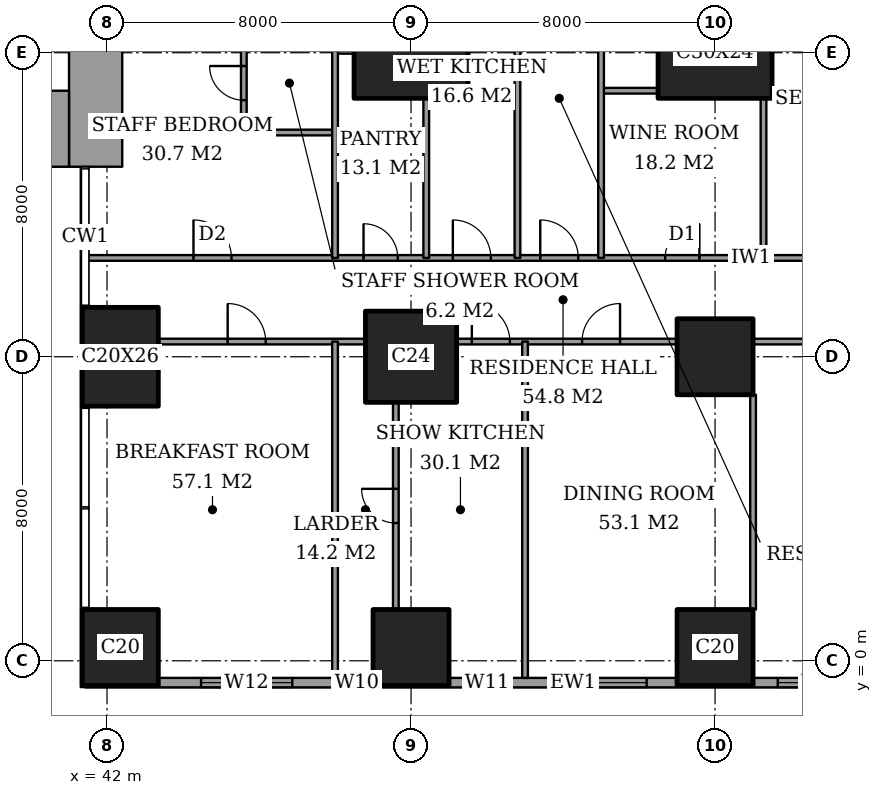
"""IFC4 building model, lengths in metres.
Left out: names, types, materials, properties, quantities, classifications, styles, units other than length and angle.
Written with IfcOpenShell. Run it as: python <this file> out.ifc"""

import sys

from ifc_helpers import new_model, si_unit, direction, frame, frame_2d, origin, origin_2d, place, context, subcontext, project, spatial, rectangle, extrude, element, fill, save


model = new_model("IFC4")
c1 = context("Model", 3, precision=1e-05, world=origin(), true_north=direction((0.0, 1.0)))
c2 = subcontext(c1, "Body", "Model", "MODEL_VIEW")
j1 = project(units=[si_unit("LENGTHUNIT", "METRE"), si_unit("PLANEANGLEUNIT", "RADIAN")], contexts=[c1])
p1 = place(None, origin())
s1 = spatial("IfcSite", under=j1, at=p1, CompositionType="ELEMENT")
p2 = place(p1, origin())
s2 = spatial("IfcBuilding", under=s1, at=p2, CompositionType="ELEMENT")
p3 = place(p2, frame((0.0, 0.0, 146.6)))
s3 = spatial("IfcBuildingStorey", under=s2, at=p3, CompositionType="ELEMENT", Elevation=146.6)
p4 = place(p3, frame((42.35, 0.35, 0.0), z_axis=(0.0, 0.0, 1.0), x_axis=(1.0, 0.0, 0.0)))
e1 = element("IfcColumn", 1, at=p4, inside=s3, PredefinedType="COLUMN", context=c2, shape_type="SweptSolid", body=[
    extrude(rectangle(XDim=2.0, YDim=2.0, at=origin_2d()), origin(), (0.0, 0.0, 1.0), 3.6),
])
p5 = place(p3, frame((42.35, 8.0, 0.0), z_axis=(0.0, 0.0, 1.0), x_axis=(1.0, 0.0, 0.0)))
e2 = element("IfcColumn", 2, at=p5, inside=s3, PredefinedType="COLUMN", context=c2, shape_type="SweptSolid", body=[
    extrude(rectangle(XDim=2.0, YDim=2.6, at=origin_2d()), origin(), (0.0, 0.0, 1.0), 3.6),
])
p6 = place(p3, frame((50.0, 0.35, 0.0), z_axis=(0.0, 0.0, 1.0), x_axis=(1.0, 0.0, 0.0)))
e3 = element("IfcColumn", 3, at=p6, inside=s3, PredefinedType="COLUMN", context=c2, shape_type="SweptSolid", body=[
    extrude(rectangle(XDim=2.0, YDim=2.0, at=origin_2d()), origin(), (0.0, 0.0, 1.0), 3.6),
])
p7 = place(p3, frame((50.0, 8.0, 0.0), z_axis=(0.0, 0.0, 1.0), x_axis=(1.0, 0.0, 0.0)))
e4 = element("IfcColumn", 4, at=p7, inside=s3, PredefinedType="COLUMN", context=c2, shape_type="SweptSolid", body=[
    extrude(rectangle(XDim=2.4, YDim=2.4, at=origin_2d()), origin(), (0.0, 0.0, 1.0), 3.6),
])
p8 = place(p3, frame((50.0, 16.0, 0.0), z_axis=(0.0, 0.0, 1.0), x_axis=(1.0, 0.0, 0.0)))
e5 = element("IfcColumn", 5, at=p8, inside=s3, PredefinedType="COLUMN", context=c2, shape_type="SweptSolid", body=[
    extrude(rectangle(XDim=3.0, YDim=2.4, at=origin_2d()), origin(), (0.0, 0.0, 1.0), 3.6),
])
for number, where, z_axis, x_axis in (
    (6, (58.0, 0.35, 0.0), (0.0, 0.0, 1.0), (1.0, 0.0, 0.0)),
    (7, (58.0, 8.0, 0.0), (0.0, 0.0, 1.0), (1.0, 0.0, 0.0)),
):
    element("IfcColumn", number, at=place(p3, frame(where, z_axis=z_axis, x_axis=x_axis)), inside=s3, PredefinedType="COLUMN", context=c2, shape_type="SweptSolid", body=[
        extrude(rectangle(XDim=2.0, YDim=2.0, at=origin_2d()), origin(), (0.0, 0.0, 1.0), 3.6),
    ])
p9 = place(p3, frame((58.0, 16.0, 0.0), z_axis=(0.0, 0.0, 1.0), x_axis=(1.0, 0.0, 0.0)))
e8 = element("IfcColumn", 8, at=p9, inside=s3, PredefinedType="COLUMN", context=c2, shape_type="SweptSolid", body=[
    extrude(rectangle(XDim=3.0, YDim=2.4, at=origin_2d()), origin(), (0.0, 0.0, 1.0), 3.6),
])
p10 = place(p3, frame((37.85, 14.0, 0.0), z_axis=(0.0, 0.0, 1.0), x_axis=(1.0, 0.0, 0.0)))
e9 = element("IfcWall", 9, at=p10, inside=s3, PredefinedType="SHEAR", context=c2, shape_type="SweptSolid", body=[
    extrude(rectangle(XDim=3.15, YDim=2.0, at=frame_2d((1.575, 0.0))), origin(), (0.0, 0.0, 1.0), 3.6),
])
p11 = place(p3, frame((41.7, 13.0, 0.0), z_axis=(0.0, 0.0, 1.0), x_axis=(0.0, 1.0, 0.0)))
e10 = element("IfcWall", 10, at=p11, inside=s3, PredefinedType="SHEAR", context=c2, shape_type="SweptSolid", body=[
    extrude(rectangle(XDim=11.85, YDim=1.4, at=frame_2d((5.925, 0.0))), origin(), (0.0, 0.0, 1.0), 3.6),
])
p12 = place(p11, frame((7.5, 0.0, 0.0)))
e11 = element("IfcOpeningElement", 11, at=p12, cuts=e10, PredefinedType="OPENING", context=c2, shape_type="SweptSolid", body=[
    extrude(rectangle(XDim=1.8, YDim=2.4, at=frame_2d((0.9, 1.2))), frame((0.0, 0.71, 0.0), z_axis=(0.0, -1.0, 0.0), x_axis=(1.0, 0.0, 0.0)), (0.0, 0.0, 1.0), 1.42),
])
p13 = place(p3, frame((41.425, -0.575, 0.0), z_axis=(0.0, 0.0, 1.0), x_axis=(1.0, 0.0, 0.0)))
e12 = element("IfcWall", 12, at=p13, inside=s3, PredefinedType="SOLIDWALL", context=c2, shape_type="SweptSolid", body=[
    extrude(rectangle(XDim=21.4, YDim=0.25, at=frame_2d((10.7, 0.0))), origin(), (0.0, 0.0, 1.0), 3.6),
])
p14 = place(p13, frame((3.05, 0.0, 0.4)))
e13 = element("IfcOpeningElement", 13, at=p14, cuts=e12, PredefinedType="OPENING", context=c2, shape_type="SweptSolid", body=[
    extrude(rectangle(XDim=2.4, YDim=2.2, at=frame_2d((1.2, 1.1))), frame((0.0, 0.135, 0.0), z_axis=(0.0, -1.0, 0.0), x_axis=(1.0, 0.0, 0.0)), (0.0, 0.0, 1.0), 0.27),
])
p15 = place(p13, frame((6.85, 0.0, 0.4)))
e14 = element("IfcOpeningElement", 14, at=p15, cuts=e12, PredefinedType="OPENING", context=c2, shape_type="SweptSolid", body=[
    extrude(rectangle(XDim=0.6, YDim=2.2, at=frame_2d((0.3, 1.1))), frame((0.0, 0.135, 0.0), z_axis=(0.0, -1.0, 0.0), x_axis=(1.0, 0.0, 0.0)), (0.0, 0.0, 1.0), 0.27),
])
p16 = place(p13, frame((9.975, 0.0, 0.4)))
e15 = element("IfcOpeningElement", 15, at=p16, cuts=e12, PredefinedType="OPENING", context=c2, shape_type="SweptSolid", body=[
    extrude(rectangle(XDim=1.2, YDim=2.2, at=frame_2d((0.6, 1.1))), frame((0.0, 0.135, 0.0), z_axis=(0.0, -1.0, 0.0), x_axis=(1.0, 0.0, 0.0)), (0.0, 0.0, 1.0), 0.27),
])
p17 = place(p13, frame((12.375, 0.0, 0.4)))
e16 = element("IfcOpeningElement", 16, at=p17, cuts=e12, PredefinedType="OPENING", context=c2, shape_type="SweptSolid", body=[
    extrude(rectangle(XDim=2.4, YDim=2.2, at=frame_2d((1.2, 1.1))), frame((0.0, 0.135, 0.0), z_axis=(0.0, -1.0, 0.0), x_axis=(1.0, 0.0, 0.0)), (0.0, 0.0, 1.0), 0.27),
])
p18 = place(p13, frame((18.225, 0.0, 0.4)))
e17 = element("IfcOpeningElement", 17, at=p18, cuts=e12, PredefinedType="OPENING", context=c2, shape_type="SweptSolid", body=[
    extrude(rectangle(XDim=2.4, YDim=2.2, at=frame_2d((1.2, 1.1))), frame((0.0, 0.135, 0.0), z_axis=(0.0, -1.0, 0.0), x_axis=(1.0, 0.0, 0.0)), (0.0, 0.0, 1.0), 0.27),
])
p19 = place(p3, frame((43.35, 8.4, 0.0), z_axis=(0.0, 0.0, 1.0), x_axis=(1.0, 0.0, 0.0)))
e18 = element("IfcWall", 18, at=p19, inside=s3, PredefinedType="PARTITIONING", context=c2, shape_type="SweptSolid", body=[
    extrude(rectangle(XDim=5.45, YDim=0.15, at=frame_2d((2.725, 0.0))), origin(), (0.0, 0.0, 1.0), 3.35),
])
p20 = place(p19, frame((1.825, 0.0, 0.0)))
e19 = element("IfcOpeningElement", 19, at=p20, cuts=e18, PredefinedType="OPENING", context=c2, shape_type="SweptSolid", body=[
    extrude(rectangle(XDim=1.0, YDim=2.1, at=frame_2d((0.5, 1.05))), frame((0.0, 0.085, 0.0), z_axis=(0.0, -1.0, 0.0), x_axis=(1.0, 0.0, 0.0)), (0.0, 0.0, 1.0), 0.17),
])
p21 = place(p3, frame((51.2, 8.4, 0.0), z_axis=(0.0, 0.0, 1.0), x_axis=(1.0, 0.0, 0.0)))
e20 = element("IfcWall", 20, at=p21, inside=s3, PredefinedType="PARTITIONING", context=c2, shape_type="SweptSolid", body=[
    extrude(rectangle(XDim=5.8, YDim=0.15, at=frame_2d((2.9, 0.0))), origin(), (0.0, 0.0, 1.0), 3.35),
])
p22 = place(p21, frame((3.3, 0.0, 0.0)))
e21 = element("IfcOpeningElement", 21, at=p22, cuts=e20, PredefinedType="OPENING", context=c2, shape_type="SweptSolid", body=[
    extrude(rectangle(XDim=1.0, YDim=2.1, at=frame_2d((0.5, 1.05))), frame((0.0, 0.085, 0.0), z_axis=(0.0, -1.0, 0.0), x_axis=(1.0, 0.0, 0.0)), (0.0, 0.0, 1.0), 0.17),
])
p23 = place(p21, frame((0.4, 0.0, 0.0)))
e22 = element("IfcOpeningElement", 22, at=p23, cuts=e20, PredefinedType="OPENING", context=c2, shape_type="SweptSolid", body=[
    extrude(rectangle(XDim=1.0, YDim=2.1, at=frame_2d((0.5, 1.05))), frame((0.0, 0.085, 0.0), z_axis=(0.0, -1.0, 0.0), x_axis=(1.0, 0.0, 0.0)), (0.0, 0.0, 1.0), 0.17),
])
p24 = place(p3, frame((59.0, 8.4, 0.0), z_axis=(0.0, 0.0, 1.0), x_axis=(1.0, 0.0, 0.0)))
e23 = element("IfcWall", 23, at=p24, inside=s3, PredefinedType="PARTITIONING", context=c2, shape_type="SweptSolid", body=[
    extrude(rectangle(XDim=5.65, YDim=0.15, at=frame_2d((2.825, 0.0))), origin(), (0.0, 0.0, 1.0), 3.35),
])
p25 = place(p24, frame((2.325, 0.0, 0.0)))
e24 = element("IfcOpeningElement", 24, at=p25, cuts=e23, PredefinedType="OPENING", context=c2, shape_type="SweptSolid", body=[
    extrude(rectangle(XDim=1.0, YDim=2.1, at=frame_2d((0.5, 1.05))), frame((0.0, 0.085, 0.0), z_axis=(0.0, -1.0, 0.0), x_axis=(1.0, 0.0, 0.0)), (0.0, 0.0, 1.0), 0.17),
])
p26 = place(p3, frame((41.439, 10.6, 0.0), z_axis=(0.0, 0.0, 1.0), x_axis=(1.0, 0.0, 0.0)))
e25 = element("IfcWall", 25, at=p26, inside=s3, PredefinedType="PARTITIONING", context=c2, shape_type="SweptSolid", body=[
    extrude(rectangle(XDim=25.011, YDim=0.15, at=frame_2d((12.505, 0.0))), origin(), (0.0, 0.0, 1.0), 3.35),
])
p27 = place(p26, frame((11.961, 0.0, 0.0)))
e26 = element("IfcOpeningElement", 26, at=p27, cuts=e25, PredefinedType="OPENING", context=c2, shape_type="SweptSolid", body=[
    extrude(rectangle(XDim=1.0, YDim=2.1, at=frame_2d((0.5, 1.05))), frame((0.0, 0.085, 0.0), z_axis=(0.0, -1.0, 0.0), x_axis=(1.0, 0.0, 0.0)), (0.0, 0.0, 1.0), 0.17),
])
p28 = place(p26, frame((20.924, 0.0, 0.0)))
e27 = element("IfcOpeningElement", 27, at=p28, cuts=e25, PredefinedType="OPENING", context=c2, shape_type="SweptSolid", body=[
    extrude(rectangle(XDim=1.0, YDim=2.1, at=frame_2d((0.5, 1.05))), frame((0.0, 0.085, 0.0), z_axis=(0.0, -1.0, 0.0), x_axis=(1.0, 0.0, 0.0)), (0.0, 0.0, 1.0), 0.17),
])
p29 = place(p26, frame((15.249, 0.0, 0.0)))
e28 = element("IfcOpeningElement", 28, at=p29, cuts=e25, PredefinedType="OPENING", context=c2, shape_type="SweptSolid", body=[
    extrude(rectangle(XDim=0.9, YDim=2.1, at=frame_2d((0.45, 1.05))), frame((0.0, 0.085, 0.0), z_axis=(0.0, -1.0, 0.0), x_axis=(1.0, 0.0, 0.0)), (0.0, 0.0, 1.0), 0.17),
])
p30 = place(p26, frame((9.661, 0.0, 0.0)))
e29 = element("IfcOpeningElement", 29, at=p30, cuts=e25, PredefinedType="OPENING", context=c2, shape_type="SweptSolid", body=[
    extrude(rectangle(XDim=1.0, YDim=2.1, at=frame_2d((0.5, 1.05))), frame((0.0, 0.085, 0.0), z_axis=(0.0, -1.0, 0.0), x_axis=(1.0, 0.0, 0.0)), (0.0, 0.0, 1.0), 0.17),
])
p31 = place(p26, frame((7.311, 0.0, 0.0)))
e30 = element("IfcOpeningElement", 30, at=p31, cuts=e25, PredefinedType="OPENING", context=c2, shape_type="SweptSolid", body=[
    extrude(rectangle(XDim=0.9, YDim=2.1, at=frame_2d((0.45, 1.05))), frame((0.0, 0.085, 0.0), z_axis=(0.0, -1.0, 0.0), x_axis=(1.0, 0.0, 0.0)), (0.0, 0.0, 1.0), 0.17),
])
p32 = place(p26, frame((2.836, 0.0, 0.0)))
e31 = element("IfcOpeningElement", 31, at=p32, cuts=e25, PredefinedType="OPENING", context=c2, shape_type="SweptSolid", body=[
    extrude(rectangle(XDim=1.0, YDim=2.1, at=frame_2d((0.5, 1.05))), frame((0.0, 0.085, 0.0), z_axis=(0.0, -1.0, 0.0), x_axis=(1.0, 0.0, 0.0)), (0.0, 0.0, 1.0), 0.17),
])
p33 = place(p3, frame((45.6, 13.9, 0.0), z_axis=(0.0, 0.0, 1.0), x_axis=(1.0, 0.0, 0.0)))
e32 = element("IfcWall", 32, at=p33, inside=s3, PredefinedType="PARTITIONING", context=c2, shape_type="SweptSolid", body=[
    extrude(rectangle(XDim=2.4, YDim=0.15, at=frame_2d((1.2, 0.0))), origin(), (0.0, 0.0, 1.0), 3.35),
])
p34 = place(p3, frame((55.0, 15.0, 0.0), z_axis=(0.0, 0.0, 1.0), x_axis=(1.0, 0.0, 0.0)))
e33 = element("IfcWall", 33, at=p34, inside=s3, PredefinedType="PARTITIONING", context=c2, shape_type="SweptSolid", body=[
    extrude(rectangle(XDim=1.5, YDim=0.15, at=frame_2d((0.75, 0.0))), origin(), (0.0, 0.0, 1.0), 3.35),
])
p35 = place(p3, frame((48.0, 16.05, 0.0), z_axis=(0.0, 0.0, 1.0), x_axis=(1.0, 0.0, 0.0)))
e34 = element("IfcWall", 34, at=p35, inside=s3, PredefinedType="PARTITIONING", context=c2, shape_type="SweptSolid", body=[
    extrude(rectangle(XDim=0.5, YDim=0.15, at=frame_2d((0.25, 0.0))), origin(), (0.0, 0.0, 1.0), 2.634),
])
p36 = place(p3, frame((45.6, 13.9, 0.0), z_axis=(0.0, 0.0, 1.0), x_axis=(0.0, 1.0, 0.0)))
e35 = element("IfcWall", 35, at=p36, inside=s3, PredefinedType="PARTITIONING", context=c2, shape_type="SweptSolid", body=[
    extrude(rectangle(XDim=2.6, YDim=0.15, at=frame_2d((1.3, 0.0))), origin(), (0.0, 0.0, 1.0), 3.35),
])
p37 = place(p36, frame((0.85, 0.0, 0.0)))
e36 = element("IfcOpeningElement", 36, at=p37, cuts=e35, PredefinedType="OPENING", context=c2, shape_type="SweptSolid", body=[
    extrude(rectangle(XDim=0.9, YDim=2.1, at=frame_2d((0.45, 1.05))), frame((0.0, 0.085, 0.0), z_axis=(0.0, -1.0, 0.0), x_axis=(1.0, 0.0, 0.0)), (0.0, 0.0, 1.0), 0.17),
])
p38 = place(p3, frame((48.0, -0.45, 0.0), z_axis=(0.0, 0.0, 1.0), x_axis=(0.0, 1.0, 0.0)))
e37 = element("IfcWall", 37, at=p38, inside=s3, PredefinedType="PARTITIONING", context=c2, shape_type="SweptSolid", body=[
    extrude(rectangle(XDim=8.85, YDim=0.15, at=frame_2d((4.425, 0.0))), origin(), (0.0, 0.0, 1.0), 3.35),
])
p39 = place(p3, frame((48.0, 10.6, 0.0), z_axis=(0.0, 0.0, 1.0), x_axis=(0.0, 1.0, 0.0)))
e38 = element("IfcWall", 38, at=p39, inside=s3, PredefinedType="PARTITIONING", context=c2, shape_type="SweptSolid", body=[
    extrude(rectangle(XDim=8.4, YDim=0.15, at=frame_2d((4.2, 0.0))), origin(), (0.0, 0.0, 1.0), 3.35),
])
p40 = place(p39, frame((6.7, 0.0, 0.0)))
e39 = element("IfcOpeningElement", 39, at=p40, cuts=e38, PredefinedType="OPENING", context=c2, shape_type="SweptSolid", body=[
    extrude(rectangle(XDim=0.9, YDim=2.1, at=frame_2d((0.45, 1.05))), frame((0.0, 0.085, 0.0), z_axis=(0.0, -1.0, 0.0), x_axis=(1.0, 0.0, 0.0)), (0.0, 0.0, 1.0), 0.17),
])
p41 = place(p3, frame((49.6, 1.35, 0.0), z_axis=(0.0, 0.0, 1.0), x_axis=(0.0, 1.0, 0.0)))
e40 = element("IfcWall", 40, at=p41, inside=s3, PredefinedType="PARTITIONING", context=c2, shape_type="SweptSolid", body=[
    extrude(rectangle(XDim=5.45, YDim=0.15, at=frame_2d((2.725, 0.0))), origin(), (0.0, 0.0, 1.0), 3.35),
])
p42 = place(p41, frame((2.275, 0.0, 0.0)))
e41 = element("IfcOpeningElement", 41, at=p42, cuts=e40, PredefinedType="OPENING", context=c2, shape_type="SweptSolid", body=[
    extrude(rectangle(XDim=0.9, YDim=2.1, at=frame_2d((0.45, 1.05))), frame((0.0, 0.085, 0.0), z_axis=(0.0, -1.0, 0.0), x_axis=(1.0, 0.0, 0.0)), (0.0, 0.0, 1.0), 0.17),
])
p43 = place(p3, frame((50.4, 10.6, 0.0), z_axis=(0.0, 0.0, 1.0), x_axis=(0.0, 1.0, 0.0)))
e42 = element("IfcWall", 42, at=p43, inside=s3, PredefinedType="PARTITIONING", context=c2, shape_type="SweptSolid", body=[
    extrude(rectangle(XDim=4.2, YDim=0.15, at=frame_2d((2.1, 0.0))), origin(), (0.0, 0.0, 1.0), 3.35),
])
p44 = place(p3, frame((52.8, 10.6, 0.0), z_axis=(0.0, 0.0, 1.0), x_axis=(0.0, 1.0, 0.0)))
e43 = element("IfcWall", 43, at=p44, inside=s3, PredefinedType="PARTITIONING", context=c2, shape_type="SweptSolid", body=[
    extrude(rectangle(XDim=8.4, YDim=0.15, at=frame_2d((4.2, 0.0))), origin(), (0.0, 0.0, 1.0), 3.35),
])
p45 = place(p3, frame((53.0, -0.45, 0.0), z_axis=(0.0, 0.0, 1.0), x_axis=(0.0, 1.0, 0.0)))
e44 = element("IfcWall", 44, at=p45, inside=s3, PredefinedType="PARTITIONING", context=c2, shape_type="SweptSolid", body=[
    extrude(rectangle(XDim=8.85, YDim=0.15, at=frame_2d((4.425, 0.0))), origin(), (0.0, 0.0, 1.0), 3.35),
])
p46 = place(p3, frame((55.0, 10.6, 0.0), z_axis=(0.0, 0.0, 1.0), x_axis=(0.0, 1.0, 0.0)))
e45 = element("IfcWall", 45, at=p46, inside=s3, PredefinedType="PARTITIONING", context=c2, shape_type="SweptSolid", body=[
    extrude(rectangle(XDim=11.0, YDim=0.15, at=frame_2d((5.5, 0.0))), origin(), (0.0, 0.0, 1.0), 3.35),
])
p47 = place(p46, frame((9.2, 0.0, 0.0)))
e46 = element("IfcOpeningElement", 46, at=p47, cuts=e45, PredefinedType="OPENING", context=c2, shape_type="SweptSolid", body=[
    extrude(rectangle(XDim=1.0, YDim=2.1, at=frame_2d((0.5, 1.05))), frame((0.0, 0.085, 0.0), z_axis=(0.0, -1.0, 0.0), x_axis=(1.0, 0.0, 0.0)), (0.0, 0.0, 1.0), 0.17),
])
p48 = place(p3, frame((59.0, 1.35, 0.0), z_axis=(0.0, 0.0, 1.0), x_axis=(0.0, 1.0, 0.0)))
e47 = element("IfcWall", 47, at=p48, inside=s3, PredefinedType="PARTITIONING", context=c2, shape_type="SweptSolid", body=[
    extrude(rectangle(XDim=5.65, YDim=0.15, at=frame_2d((2.825, 0.0))), origin(), (0.0, 0.0, 1.0), 3.35),
])
p49 = place(p3, frame((59.275, 10.6, 0.0), z_axis=(0.0, 0.0, 1.0), x_axis=(0.0, 1.0, 0.0)))
e48 = element("IfcWall", 48, at=p49, inside=s3, PredefinedType="PARTITIONING", context=c2, shape_type="SweptSolid", body=[
    extrude(rectangle(XDim=4.2, YDim=0.15, at=frame_2d((2.1, 0.0))), origin(), (0.0, 0.0, 1.0), 3.35),
])
p50 = place(p14, origin())
e49 = element("IfcWindow", 49, at=p50, inside=s3, PartitioningType="SINGLE_PANEL", PredefinedType="WINDOW", context=c2, shape_type="SweptSolid", body=[
    extrude(rectangle(XDim=2.4, YDim=2.2, at=frame_2d((1.2, 1.1))), frame((0.0, 0.03, 0.0), z_axis=(0.0, -1.0, 0.0), x_axis=(1.0, 0.0, 0.0)), (0.0, 0.0, 1.0), 0.06),
])
fill(e13, e49)
p51 = place(p15, origin())
e50 = element("IfcWindow", 50, at=p51, inside=s3, PartitioningType="SINGLE_PANEL", PredefinedType="WINDOW", context=c2, shape_type="SweptSolid", body=[
    extrude(rectangle(XDim=0.6, YDim=2.2, at=frame_2d((0.3, 1.1))), frame((0.0, 0.03, 0.0), z_axis=(0.0, -1.0, 0.0), x_axis=(1.0, 0.0, 0.0)), (0.0, 0.0, 1.0), 0.06),
])
fill(e14, e50)
p52 = place(p16, origin())
e51 = element("IfcWindow", 51, at=p52, inside=s3, PartitioningType="SINGLE_PANEL", PredefinedType="WINDOW", context=c2, shape_type="SweptSolid", body=[
    extrude(rectangle(XDim=1.2, YDim=2.2, at=frame_2d((0.6, 1.1))), frame((0.0, 0.03, 0.0), z_axis=(0.0, -1.0, 0.0), x_axis=(1.0, 0.0, 0.0)), (0.0, 0.0, 1.0), 0.06),
])
fill(e15, e51)
p53 = place(p17, origin())
e52 = element("IfcWindow", 52, at=p53, inside=s3, PartitioningType="SINGLE_PANEL", PredefinedType="WINDOW", context=c2, shape_type="SweptSolid", body=[
    extrude(rectangle(XDim=2.4, YDim=2.2, at=frame_2d((1.2, 1.1))), frame((0.0, 0.03, 0.0), z_axis=(0.0, -1.0, 0.0), x_axis=(1.0, 0.0, 0.0)), (0.0, 0.0, 1.0), 0.06),
])
fill(e16, e52)
p54 = place(p18, origin())
e53 = element("IfcWindow", 53, at=p54, inside=s3, PartitioningType="SINGLE_PANEL", PredefinedType="WINDOW", context=c2, shape_type="SweptSolid", body=[
    extrude(rectangle(XDim=2.4, YDim=2.2, at=frame_2d((1.2, 1.1))), frame((0.0, 0.03, 0.0), z_axis=(0.0, -1.0, 0.0), x_axis=(1.0, 0.0, 0.0)), (0.0, 0.0, 1.0), 0.06),
])
fill(e17, e53)
p55 = place(p22, origin())
e54 = element("IfcDoor", 54, at=p55, inside=s3, OperationType="SINGLE_SWING_LEFT", PredefinedType="DOOR", context=c2, shape_type="SweptSolid", body=[
    extrude(rectangle(XDim=1.0, YDim=2.1, at=frame_2d((0.5, 1.05))), frame((0.0, 0.025, 0.0), z_axis=(0.0, -1.0, 0.0), x_axis=(1.0, 0.0, 0.0)), (0.0, 0.0, 1.0), 0.05),
])
fill(e21, e54)
p56 = place(p23, origin())
e55 = element("IfcDoor", 55, at=p56, inside=s3, OperationType="SINGLE_SWING_RIGHT", PredefinedType="DOOR", context=c2, shape_type="SweptSolid", body=[
    extrude(rectangle(XDim=1.0, YDim=2.1, at=frame_2d((0.5, 1.05))), frame((0.0, 0.025, 0.0), z_axis=(0.0, -1.0, 0.0), x_axis=(1.0, 0.0, 0.0)), (0.0, 0.0, 1.0), 0.05),
])
fill(e22, e55)
p57 = place(p42, origin())
e56 = element("IfcDoor", 56, at=p57, inside=s3, OperationType="SINGLE_SWING_LEFT", PredefinedType="DOOR", context=c2, shape_type="SweptSolid", body=[
    extrude(rectangle(XDim=0.9, YDim=2.1, at=frame_2d((0.45, 1.05))), frame((0.0, 0.025, 0.0), z_axis=(0.0, -1.0, 0.0), x_axis=(1.0, 0.0, 0.0)), (0.0, 0.0, 1.0), 0.05),
])
fill(e41, e56)
p58 = place(p20, origin())
e57 = element("IfcDoor", 57, at=p58, inside=s3, OperationType="SINGLE_SWING_RIGHT", PredefinedType="DOOR", context=c2, shape_type="SweptSolid", body=[
    extrude(rectangle(XDim=1.0, YDim=2.1, at=frame_2d((0.5, 1.05))), frame((0.0, 0.025, 0.0), z_axis=(0.0, -1.0, 0.0), x_axis=(1.0, 0.0, 0.0)), (0.0, 0.0, 1.0), 0.05),
])
fill(e19, e57)
p59 = place(p27, origin())
e58 = element("IfcDoor", 58, at=p59, inside=s3, OperationType="SINGLE_SWING_RIGHT", PredefinedType="DOOR", context=c2, shape_type="SweptSolid", body=[
    extrude(rectangle(XDim=1.0, YDim=2.1, at=frame_2d((0.5, 1.05))), frame((0.0, 0.025, 0.0), z_axis=(0.0, -1.0, 0.0), x_axis=(1.0, 0.0, 0.0)), (0.0, 0.0, 1.0), 0.05),
])
fill(e26, e58)
p60 = place(p29, origin())
e59 = element("IfcDoor", 59, at=p60, inside=s3, OperationType="SINGLE_SWING_LEFT", PredefinedType="DOOR", context=c2, shape_type="SweptSolid", body=[
    extrude(rectangle(XDim=0.9, YDim=2.1, at=frame_2d((0.45, 1.05))), frame((0.0, 0.025, 0.0), z_axis=(0.0, -1.0, 0.0), x_axis=(1.0, 0.0, 0.0)), (0.0, 0.0, 1.0), 0.05),
])
fill(e28, e59)
p61 = place(p30, origin())
e60 = element("IfcDoor", 60, at=p61, inside=s3, OperationType="SINGLE_SWING_RIGHT", PredefinedType="DOOR", context=c2, shape_type="SweptSolid", body=[
    extrude(rectangle(XDim=1.0, YDim=2.1, at=frame_2d((0.5, 1.05))), frame((0.0, 0.025, 0.0), z_axis=(0.0, -1.0, 0.0), x_axis=(1.0, 0.0, 0.0)), (0.0, 0.0, 1.0), 0.05),
])
fill(e29, e60)
p62 = place(p31, origin())
e61 = element("IfcDoor", 61, at=p62, inside=s3, OperationType="SINGLE_SWING_RIGHT", PredefinedType="DOOR", context=c2, shape_type="SweptSolid", body=[
    extrude(rectangle(XDim=0.9, YDim=2.1, at=frame_2d((0.45, 1.05))), frame((0.0, 0.025, 0.0), z_axis=(0.0, -1.0, 0.0), x_axis=(1.0, 0.0, 0.0)), (0.0, 0.0, 1.0), 0.05),
])
fill(e30, e61)
p63 = place(p37, origin())
e62 = element("IfcDoor", 62, at=p63, inside=s3, OperationType="SINGLE_SWING_LEFT", PredefinedType="DOOR", context=c2, shape_type="SweptSolid", body=[
    extrude(rectangle(XDim=0.9, YDim=2.1, at=frame_2d((0.45, 1.05))), frame((0.0, 0.025, 0.0), z_axis=(0.0, -1.0, 0.0), x_axis=(1.0, 0.0, 0.0)), (0.0, 0.0, 1.0), 0.05),
])
fill(e36, e62)
p64 = place(p32, origin())
e63 = element("IfcDoor", 63, at=p64, inside=s3, OperationType="SINGLE_SWING_RIGHT", PredefinedType="DOOR", context=c2, shape_type="SweptSolid", body=[
    extrude(rectangle(XDim=1.0, YDim=2.1, at=frame_2d((0.5, 1.05))), frame((0.0, 0.025, 0.0), z_axis=(0.0, -1.0, 0.0), x_axis=(1.0, 0.0, 0.0)), (0.0, 0.0, 1.0), 0.05),
])
fill(e31, e63)
save(model, sys.argv[1])
